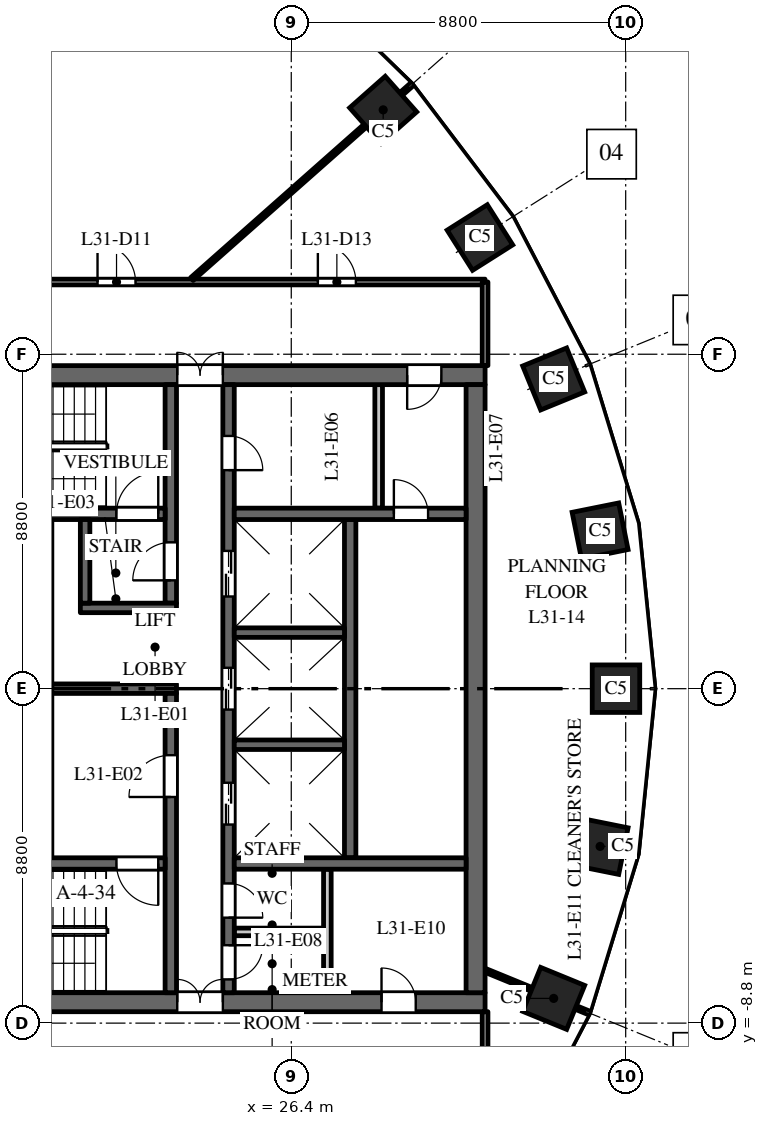
"""IFC4 building model, lengths in metres.
Left out: names, types, materials, properties, quantities, classifications, styles, units other than length and angle.
Written with IfcOpenShell. Run it as: python <this file> out.ifc"""

import sys

from ifc_helpers import new_model, si_unit, direction, frame, frame_2d, origin, origin_2d, place, context, subcontext, project, spatial, rectangle, extrude, element, fill, save


model = new_model("IFC4")
c1 = context("Model", 3, precision=1e-05, world=origin(), true_north=direction((0.0, 1.0)))
c2 = subcontext(c1, "Body", "Model", "MODEL_VIEW")
j1 = project(units=[si_unit("LENGTHUNIT", "METRE"), si_unit("PLANEANGLEUNIT", "RADIAN")], contexts=[c1])
p1 = place(None, origin())
s1 = spatial("IfcSite", under=j1, at=p1, CompositionType="ELEMENT")
p2 = place(p1, origin())
s2 = spatial("IfcBuilding", under=s1, at=p2, CompositionType="ELEMENT")
p3 = place(p2, frame((0.0, 0.0, 136.0)))
s3 = spatial("IfcBuildingStorey", under=s2, at=p3, CompositionType="ELEMENT", Elevation=136.0)
for number, where, z_axis, x_axis in (
    (1, (34.945, 0.0, 0.0), (0.0, 0.0, 1.0), (0.0, 1.0, 0.0)),
    (2, (34.527, 4.151, 0.0), (0.0, 0.0, 1.0), (-0.197, 0.98, 0.0)),
    (3, (33.305, 8.149, 0.0), (0.0, 0.0, 1.0), (-0.379, 0.925, 0.0)),
    (4, (31.365, 11.871, 0.0), (0.0, 0.0, 1.0), (-0.535, 0.845, 0.0)),
    (5, (28.819, 15.23, 0.0), (0.0, 0.0, 1.0), (-0.663, 0.749, 0.0)),
    (6, (33.305, -8.149, 0.0), (0.0, 0.0, 1.0), (0.379, 0.925, 0.0)),
    (7, (34.527, -4.151, 0.0), (0.0, 0.0, 1.0), (0.197, 0.98, 0.0)),
):
    element("IfcColumn", number, at=place(p3, frame(where, z_axis=z_axis, x_axis=x_axis)), inside=s3, PredefinedType="COLUMN", context=c2, shape_type="SweptSolid", body=[
        extrude(rectangle(XDim=1.25, YDim=1.25, at=origin_2d()), origin(), (0.0, 0.0, 1.0), 4.0),
    ])
p4 = place(p3, frame((16.5, 8.25, 0.0), z_axis=(0.0, 0.0, 1.0), x_axis=(1.0, 0.0, 0.0)))
e8 = element("IfcWall", 8, at=p4, inside=s3, PredefinedType="SHEAR", context=c2, shape_type="SweptSolid", body=[
    extrude(rectangle(XDim=15.0, YDim=0.5, at=frame_2d((7.5, 0.0))), origin(), (0.0, 0.0, 1.0), 3.7),
])
p5 = place(p4, frame((6.9, 0.0, 0.0)))
e9 = element("IfcOpeningElement", 9, at=p5, cuts=e8, PredefinedType="OPENING", context=c2, shape_type="SweptSolid", body=[
    extrude(rectangle(XDim=1.2, YDim=2.1, at=frame_2d((0.6, 1.05))), frame((0.0, 0.26, 0.0), z_axis=(0.0, -1.0, 0.0), x_axis=(1.0, 0.0, 0.0)), (0.0, 0.0, 1.0), 0.52),
])
p6 = place(p4, frame((12.95, 0.0, 0.0)))
e10 = element("IfcOpeningElement", 10, at=p6, cuts=e8, PredefinedType="OPENING", context=c2, shape_type="SweptSolid", body=[
    extrude(rectangle(XDim=0.9, YDim=2.1, at=frame_2d((0.45, 1.05))), frame((0.0, 0.26, 0.0), z_axis=(0.0, -1.0, 0.0), x_axis=(1.0, 0.0, 0.0)), (0.0, 0.0, 1.0), 0.52),
])
p7 = place(p3, frame((16.5, -8.25, 0.0), z_axis=(0.0, 0.0, 1.0), x_axis=(1.0, 0.0, 0.0)))
e11 = element("IfcWall", 11, at=p7, inside=s3, PredefinedType="SHEAR", context=c2, shape_type="SweptSolid", body=[
    extrude(rectangle(XDim=15.0, YDim=0.5, at=frame_2d((7.5, 0.0))), origin(), (0.0, 0.0, 1.0), 3.7),
])
p8 = place(p7, frame((6.9, 0.0, 0.0)))
e12 = element("IfcOpeningElement", 12, at=p8, cuts=e11, PredefinedType="OPENING", context=c2, shape_type="SweptSolid", body=[
    extrude(rectangle(XDim=1.2, YDim=2.1, at=frame_2d((0.6, 1.05))), frame((0.0, 0.26, 0.0), z_axis=(0.0, -1.0, 0.0), x_axis=(1.0, 0.0, 0.0)), (0.0, 0.0, 1.0), 0.52),
])
p9 = place(p7, frame((12.275, 0.0, 0.0)))
e13 = element("IfcOpeningElement", 13, at=p9, cuts=e11, PredefinedType="OPENING", context=c2, shape_type="SweptSolid", body=[
    extrude(rectangle(XDim=0.9, YDim=2.1, at=frame_2d((0.45, 1.05))), frame((0.0, 0.26, 0.0), z_axis=(0.0, -1.0, 0.0), x_axis=(1.0, 0.0, 0.0)), (0.0, 0.0, 1.0), 0.52),
])
p10 = place(p3, frame((27.95, -4.45, 0.0), z_axis=(0.0, 0.0, 1.0), x_axis=(0.0, 1.0, 0.0)))
e14 = element("IfcWall", 14, at=p10, inside=s3, PredefinedType="SHEAR", context=c2, shape_type="SweptSolid", body=[
    extrude(rectangle(XDim=8.9, YDim=0.3, at=frame_2d((4.45, 0.0))), origin(), (0.0, 0.0, 1.0), 3.7),
])
p11 = place(p3, frame((24.75, -8.0, 0.0), z_axis=(0.0, 0.0, 1.0), x_axis=(0.0, 1.0, 0.0)))
e15 = element("IfcWall", 15, at=p11, inside=s3, PredefinedType="SHEAR", context=c2, shape_type="SweptSolid", body=[
    extrude(rectangle(XDim=16.0, YDim=0.3, at=frame_2d((8.0, 0.0))), origin(), (0.0, 0.0, 1.0), 3.7),
])
p12 = place(p11, frame((4.425, 0.0, 0.0)))
e16 = element("IfcOpeningElement", 16, at=p12, cuts=e15, PredefinedType="OPENING", context=c2, shape_type="SweptSolid", body=[
    extrude(rectangle(XDim=1.1, YDim=2.1, at=frame_2d((0.55, 1.05))), frame((0.0, 0.16, 0.0), z_axis=(0.0, -1.0, 0.0), x_axis=(1.0, 0.0, 0.0)), (0.0, 0.0, 1.0), 0.32),
])
p13 = place(p11, frame((7.45, 0.0, 0.0)))
e17 = element("IfcOpeningElement", 17, at=p13, cuts=e15, PredefinedType="OPENING", context=c2, shape_type="SweptSolid", body=[
    extrude(rectangle(XDim=1.1, YDim=2.1, at=frame_2d((0.55, 1.05))), frame((0.0, 0.16, 0.0), z_axis=(0.0, -1.0, 0.0), x_axis=(1.0, 0.0, 0.0)), (0.0, 0.0, 1.0), 0.32),
])
p14 = place(p11, frame((10.425, 0.0, 0.0)))
e18 = element("IfcOpeningElement", 18, at=p14, cuts=e15, PredefinedType="OPENING", context=c2, shape_type="SweptSolid", body=[
    extrude(rectangle(XDim=1.2, YDim=2.1, at=frame_2d((0.6, 1.05))), frame((0.0, 0.16, 0.0), z_axis=(0.0, -1.0, 0.0), x_axis=(1.0, 0.0, 0.0)), (0.0, 0.0, 1.0), 0.32),
])
p15 = place(p11, frame((13.75, 0.0, 0.0)))
e19 = element("IfcOpeningElement", 19, at=p15, cuts=e15, PredefinedType="OPENING", context=c2, shape_type="SweptSolid", body=[
    extrude(rectangle(XDim=0.9, YDim=2.1, at=frame_2d((0.45, 1.05))), frame((0.0, 0.16, 0.0), z_axis=(0.0, -1.0, 0.0), x_axis=(1.0, 0.0, 0.0)), (0.0, 0.0, 1.0), 0.32),
])
p16 = place(p11, frame((1.975, 0.0, 0.0)))
e20 = element("IfcOpeningElement", 20, at=p16, cuts=e15, PredefinedType="OPENING", context=c2, shape_type="SweptSolid", body=[
    extrude(rectangle(XDim=0.9, YDim=2.1, at=frame_2d((0.45, 1.05))), frame((0.0, 0.16, 0.0), z_axis=(0.0, -1.0, 0.0), x_axis=(1.0, 0.0, 0.0)), (0.0, 0.0, 1.0), 0.32),
])
p17 = place(p11, frame((0.35, 0.0, 0.0)))
e21 = element("IfcOpeningElement", 21, at=p17, cuts=e15, PredefinedType="OPENING", context=c2, shape_type="SweptSolid", body=[
    extrude(rectangle(XDim=0.9, YDim=2.1, at=frame_2d((0.45, 1.05))), frame((0.0, 0.16, 0.0), z_axis=(0.0, -1.0, 0.0), x_axis=(1.0, 0.0, 0.0)), (0.0, 0.0, 1.0), 0.32),
])
p18 = place(p3, frame((20.1, 0.0, 0.0), z_axis=(0.0, 0.0, 1.0), x_axis=(1.0, 0.0, 0.0)))
e22 = element("IfcWall", 22, at=p18, inside=s3, PredefinedType="SHEAR", context=c2, shape_type="SweptSolid", body=[
    extrude(rectangle(XDim=3.28, YDim=0.25, at=frame_2d((1.64, 0.0))), origin(), (0.0, 0.0, 1.0), 3.7),
])
p19 = place(p3, frame((31.25, -8.0, 0.0), z_axis=(0.0, 0.0, 1.0), x_axis=(0.0, 1.0, 0.0)))
e23 = element("IfcWall", 23, at=p19, inside=s3, PredefinedType="SHEAR", context=c2, shape_type="SweptSolid", body=[
    extrude(rectangle(XDim=16.0, YDim=0.5, at=frame_2d((8.0, 0.0))), origin(), (0.0, 0.0, 1.0), 3.7),
])
p20 = place(p3, frame((24.9, 4.6, 0.0), z_axis=(0.0, 0.0, 1.0), x_axis=(1.0, 0.0, 0.0)))
e24 = element("IfcWall", 24, at=p20, inside=s3, PredefinedType="SHEAR", context=c2, shape_type="SweptSolid", body=[
    extrude(rectangle(XDim=6.1, YDim=0.3, at=frame_2d((3.05, 0.0))), origin(), (0.0, 0.0, 1.0), 3.7),
])
p21 = place(p20, frame((4.2, 0.0, 0.0)))
e25 = element("IfcOpeningElement", 25, at=p21, cuts=e24, PredefinedType="OPENING", context=c2, shape_type="SweptSolid", body=[
    extrude(rectangle(XDim=0.9, YDim=2.1, at=frame_2d((0.45, 1.05))), frame((0.0, 0.16, 0.0), z_axis=(0.0, -1.0, 0.0), x_axis=(1.0, 0.0, 0.0)), (0.0, 0.0, 1.0), 0.32),
])
for number, where, z_axis, x_axis in (
    (26, (28.7, 4.75, 0.0), (0.0, 0.0, 1.0), (0.0, 1.0, 0.0)),
    (27, (27.35, -8.0, 0.0), (0.0, 0.0, 1.0), (0.0, 1.0, 0.0)),
):
    element("IfcWall", number, at=place(p3, frame(where, z_axis=z_axis, x_axis=x_axis)), inside=s3, PredefinedType="PARTITIONING", context=c2, shape_type="SweptSolid", body=[
        extrude(rectangle(XDim=3.25, YDim=0.2, at=frame_2d((1.625, 0.0))), origin(), (0.0, 0.0, 1.0), 3.7),
    ])
p22 = place(p3, frame((24.9, -6.4, 0.0), z_axis=(0.0, 0.0, 1.0), x_axis=(1.0, 0.0, 0.0)))
e28 = element("IfcWall", 28, at=p22, inside=s3, PredefinedType="PARTITIONING", context=c2, shape_type="SweptSolid", body=[
    extrude(rectangle(XDim=2.35, YDim=0.2, at=frame_2d((1.175, 0.0))), origin(), (0.0, 0.0, 1.0), 3.7),
])
p23 = place(p3, frame((24.9, -4.6, 0.0), z_axis=(0.0, 0.0, 1.0), x_axis=(1.0, 0.0, 0.0)))
e29 = element("IfcWall", 29, at=p23, inside=s3, PredefinedType="SHEAR", context=c2, shape_type="SweptSolid", body=[
    extrude(rectangle(XDim=6.1, YDim=0.3, at=frame_2d((3.05, 0.0))), origin(), (0.0, 0.0, 1.0), 3.7),
])
for number, where, z_axis, x_axis in (
    (30, (24.9, -1.475, 0.0), (0.0, 0.0, 1.0), (1.0, 0.0, 0.0)),
    (31, (24.9, 1.475, 0.0), (0.0, 0.0, 1.0), (1.0, 0.0, 0.0)),
):
    element("IfcWall", number, at=place(p3, frame(where, z_axis=z_axis, x_axis=x_axis)), inside=s3, PredefinedType="SHEAR", context=c2, shape_type="SweptSolid", body=[
        extrude(rectangle(XDim=2.9, YDim=0.25, at=frame_2d((1.45, 0.0))), origin(), (0.0, 0.0, 1.0), 3.7),
    ])
p24 = place(p3, frame((23.23, 2.25, 0.0), z_axis=(0.0, 0.0, 1.0), x_axis=(0.0, 1.0, 0.0)))
e32 = element("IfcWall", 32, at=p24, inside=s3, PredefinedType="SHEAR", context=c2, shape_type="SweptSolid", body=[
    extrude(rectangle(XDim=5.75, YDim=0.3, at=frame_2d((2.875, 0.0))), origin(), (0.0, 0.0, 1.0), 3.7),
])
p25 = place(p24, frame((0.6, 0.0, 0.0)))
e33 = element("IfcOpeningElement", 33, at=p25, cuts=e32, PredefinedType="OPENING", context=c2, shape_type="SweptSolid", body=[
    extrude(rectangle(XDim=1.0, YDim=2.1, at=frame_2d((0.5, 1.05))), frame((0.0, 0.16, 0.0), z_axis=(0.0, -1.0, 0.0), x_axis=(1.0, 0.0, 0.0)), (0.0, 0.0, 1.0), 0.32),
])
p26 = place(p3, frame((23.23, -8.0, 0.0), z_axis=(0.0, 0.0, 1.0), x_axis=(0.0, 1.0, 0.0)))
e34 = element("IfcWall", 34, at=p26, inside=s3, PredefinedType="SHEAR", context=c2, shape_type="SweptSolid", body=[
    extrude(rectangle(XDim=7.875, YDim=0.3, at=frame_2d((3.938, 0.0))), origin(), (0.0, 0.0, 1.0), 3.7),
])
p27 = place(p26, frame((5.15, 0.0, 0.0)))
e35 = element("IfcOpeningElement", 35, at=p27, cuts=e34, PredefinedType="OPENING", context=c2, shape_type="SweptSolid", body=[
    extrude(rectangle(XDim=1.1, YDim=2.1, at=frame_2d((0.55, 1.05))), frame((0.0, 0.16, 0.0), z_axis=(0.0, -1.0, 0.0), x_axis=(1.0, 0.0, 0.0)), (0.0, 0.0, 1.0), 0.32),
])
p28 = place(p3, frame((16.9, 4.6, 0.0), z_axis=(0.0, 0.0, 1.0), x_axis=(1.0, 0.0, 0.0)))
e36 = element("IfcWall", 36, at=p28, inside=s3, PredefinedType="SHEAR", context=c2, shape_type="SweptSolid", body=[
    extrude(rectangle(XDim=6.18, YDim=0.3, at=frame_2d((3.09, 0.0))), origin(), (0.0, 0.0, 1.0), 3.7),
])
p29 = place(p28, frame((4.9, 0.0, 0.0)))
e37 = element("IfcOpeningElement", 37, at=p29, cuts=e36, PredefinedType="OPENING", context=c2, shape_type="SweptSolid", body=[
    extrude(rectangle(XDim=1.1, YDim=2.1, at=frame_2d((0.55, 1.05))), frame((0.0, 0.16, 0.0), z_axis=(0.0, -1.0, 0.0), x_axis=(1.0, 0.0, 0.0)), (0.0, 0.0, 1.0), 0.32),
])
p30 = place(p3, frame((16.9, -4.6, 0.0), z_axis=(0.0, 0.0, 1.0), x_axis=(1.0, 0.0, 0.0)))
e38 = element("IfcWall", 38, at=p30, inside=s3, PredefinedType="SHEAR", context=c2, shape_type="SweptSolid", body=[
    extrude(rectangle(XDim=6.18, YDim=0.3, at=frame_2d((3.09, 0.0))), origin(), (0.0, 0.0, 1.0), 3.7),
])
p31 = place(p30, frame((4.9, 0.0, 0.0)))
e39 = element("IfcOpeningElement", 39, at=p31, cuts=e38, PredefinedType="OPENING", context=c2, shape_type="SweptSolid", body=[
    extrude(rectangle(XDim=1.1, YDim=2.1, at=frame_2d((0.55, 1.05))), frame((0.0, 0.16, 0.0), z_axis=(0.0, -1.0, 0.0), x_axis=(1.0, 0.0, 0.0)), (0.0, 0.0, 1.0), 0.32),
])
p32 = place(p3, frame((20.85, 2.125, 0.0), z_axis=(0.0, 0.0, 1.0), x_axis=(1.0, 0.0, 0.0)))
e40 = element("IfcWall", 40, at=p32, inside=s3, PredefinedType="SHEAR", context=c2, shape_type="SweptSolid", body=[
    extrude(rectangle(XDim=2.53, YDim=0.25, at=frame_2d((1.265, 0.0))), origin(), (0.0, 0.0, 1.0), 3.7),
])
p33 = place(p3, frame((20.975, 2.25, 0.0), z_axis=(0.0, 0.0, 1.0), x_axis=(0.0, 1.0, 0.0)))
e41 = element("IfcWall", 41, at=p33, inside=s3, PredefinedType="SHEAR", context=c2, shape_type="SweptSolid", body=[
    extrude(rectangle(XDim=2.2, YDim=0.25, at=frame_2d((1.1, 0.0))), origin(), (0.0, 0.0, 1.0), 3.7),
])
p34 = place(p3, frame((19.777, 10.7, 0.0), z_axis=(0.0, 0.0, 1.0), x_axis=(1.0, 0.0, 0.0)))
e42 = element("IfcWall", 42, at=p34, inside=s3, PredefinedType="PARTITIONING", context=c2, shape_type="SweptSolid", body=[
    extrude(rectangle(XDim=11.723, YDim=0.15, at=frame_2d((5.861, 0.0))), origin(), (0.0, 0.0, 1.0), 2.75),
])
p35 = place(p34, frame((1.525, 0.0, 0.0)))
e43 = element("IfcOpeningElement", 43, at=p35, cuts=e42, PredefinedType="OPENING", context=c2, shape_type="SweptSolid", body=[
    extrude(rectangle(XDim=1.0, YDim=2.1, at=frame_2d((0.5, 1.05))), frame((0.0, 0.085, 0.0), z_axis=(0.0, -1.0, 0.0), x_axis=(1.0, 0.0, 0.0)), (0.0, 0.0, 1.0), 0.17),
])
p36 = place(p34, frame((7.323, 0.0, 0.0)))
e44 = element("IfcOpeningElement", 44, at=p36, cuts=e42, PredefinedType="OPENING", context=c2, shape_type="SweptSolid", body=[
    extrude(rectangle(XDim=1.0, YDim=2.1, at=frame_2d((0.5, 1.05))), frame((0.0, 0.085, 0.0), z_axis=(0.0, -1.0, 0.0), x_axis=(1.0, 0.0, 0.0)), (0.0, 0.0, 1.0), 0.17),
])
p37 = place(p3, frame((23.785, 10.778, 0.0), z_axis=(0.0, 0.0, 1.0), x_axis=(0.748985701008, 0.662586160198, 0.0)))
e45 = element("IfcWall", 45, at=p37, inside=s3, PredefinedType="PARTITIONING", context=c2, shape_type="SweptSolid", body=[
    extrude(rectangle(XDim=7.723, YDim=0.1, at=frame_2d((3.861, 0.0))), origin(), (0.0, 0.0, 1.0), 3.7),
])
p38 = place(p3, frame((31.5, -10.7, 0.0), z_axis=(0.0, 0.0, 1.0), x_axis=(0.0, 1.0, 0.0)))
e46 = element("IfcWall", 46, at=p38, inside=s3, PredefinedType="PARTITIONING", context=c2, shape_type="SweptSolid", body=[
    extrude(rectangle(XDim=2.2, YDim=0.15, at=frame_2d((1.1, 0.0))), origin(), (0.0, 0.0, 1.0), 2.9),
])
p39 = place(p3, frame((31.5, -7.41, 0.0), z_axis=(0.0, 0.0, 1.0), x_axis=(0.925344112436, -0.379128307542, 0.0)))
e47 = element("IfcWall", 47, at=p39, inside=s3, PredefinedType="PARTITIONING", context=c2, shape_type="SweptSolid", body=[
    extrude(rectangle(XDim=2.954, YDim=0.1, at=frame_2d((1.477, 0.0))), origin(), (0.0, 0.0, 1.0), 3.7),
])
p40 = place(p3, frame((31.5, 8.5, 0.0), z_axis=(0.0, 0.0, 1.0), x_axis=(0.0, 1.0, 0.0)))
e48 = element("IfcWall", 48, at=p40, inside=s3, PredefinedType="PARTITIONING", context=c2, shape_type="SweptSolid", body=[
    extrude(rectangle(XDim=2.2, YDim=0.15, at=frame_2d((1.1, 0.0))), origin(), (0.0, 0.0, 1.0), 2.9),
])
p41 = place(p12, origin())
e49 = element("IfcDoor", 49, at=p41, inside=s3, OperationType="DOUBLE_DOOR_SLIDING", PredefinedType="DOOR", context=c2, shape_type="SweptSolid", body=[
    extrude(rectangle(XDim=1.1, YDim=2.1, at=frame_2d((0.55, 1.05))), frame((0.0, 0.025, 0.0), z_axis=(0.0, -1.0, 0.0), x_axis=(1.0, 0.0, 0.0)), (0.0, 0.0, 1.0), 0.05),
])
fill(e16, e49)
p42 = place(p13, origin())
e50 = element("IfcDoor", 50, at=p42, inside=s3, OperationType="DOUBLE_DOOR_SLIDING", PredefinedType="DOOR", context=c2, shape_type="SweptSolid", body=[
    extrude(rectangle(XDim=1.1, YDim=2.1, at=frame_2d((0.55, 1.05))), frame((0.0, 0.025, 0.0), z_axis=(0.0, -1.0, 0.0), x_axis=(1.0, 0.0, 0.0)), (0.0, 0.0, 1.0), 0.05),
])
fill(e17, e50)
p43 = place(p14, origin())
e51 = element("IfcDoor", 51, at=p43, inside=s3, OperationType="DOUBLE_DOOR_SLIDING", PredefinedType="DOOR", context=c2, shape_type="SweptSolid", body=[
    extrude(rectangle(XDim=1.2, YDim=2.1, at=frame_2d((0.6, 1.05))), frame((0.0, 0.025, 0.0), z_axis=(0.0, -1.0, 0.0), x_axis=(1.0, 0.0, 0.0)), (0.0, 0.0, 1.0), 0.05),
])
fill(e18, e51)
p44 = place(p29, origin())
e52 = element("IfcDoor", 52, at=p44, inside=s3, OperationType="SINGLE_SWING_LEFT", PredefinedType="DOOR", context=c2, shape_type="SweptSolid", body=[
    extrude(rectangle(XDim=1.1, YDim=2.1, at=frame_2d((0.55, 1.05))), frame((0.0, 0.025, 0.0), z_axis=(0.0, -1.0, 0.0), x_axis=(1.0, 0.0, 0.0)), (0.0, 0.0, 1.0), 0.05),
])
fill(e37, e52)
p45 = place(p31, origin())
e53 = element("IfcDoor", 53, at=p45, inside=s3, OperationType="SINGLE_SWING_RIGHT", PredefinedType="DOOR", context=c2, shape_type="SweptSolid", body=[
    extrude(rectangle(XDim=1.1, YDim=2.1, at=frame_2d((0.55, 1.05))), frame((0.0, 0.025, 0.0), z_axis=(0.0, -1.0, 0.0), x_axis=(1.0, 0.0, 0.0)), (0.0, 0.0, 1.0), 0.05),
])
fill(e39, e53)
p46 = place(p27, origin())
e54 = element("IfcDoor", 54, at=p46, inside=s3, OperationType="SINGLE_SWING_RIGHT", PredefinedType="DOOR", context=c2, shape_type="SweptSolid", body=[
    extrude(rectangle(XDim=1.1, YDim=2.1, at=frame_2d((0.55, 1.05))), frame((0.0, 0.025, 0.0), z_axis=(0.0, -1.0, 0.0), x_axis=(1.0, 0.0, 0.0)), (0.0, 0.0, 1.0), 0.05),
])
fill(e35, e54)
p47 = place(p25, origin())
e55 = element("IfcDoor", 55, at=p47, inside=s3, OperationType="SINGLE_SWING_RIGHT", PredefinedType="DOOR", context=c2, shape_type="SweptSolid", body=[
    extrude(rectangle(XDim=1.0, YDim=2.1, at=frame_2d((0.5, 1.05))), frame((0.0, 0.025, 0.0), z_axis=(0.0, -1.0, 0.0), x_axis=(1.0, 0.0, 0.0)), (0.0, 0.0, 1.0), 0.05),
])
fill(e33, e55)
p48 = place(p5, origin())
e56 = element("IfcDoor", 56, at=p48, inside=s3, OperationType="DOUBLE_DOOR_DOUBLE_SWING", PredefinedType="DOOR", context=c2, shape_type="SweptSolid", body=[
    extrude(rectangle(XDim=1.2, YDim=2.1, at=frame_2d((0.6, 1.05))), frame((0.0, 0.025, 0.0), z_axis=(0.0, -1.0, 0.0), x_axis=(1.0, 0.0, 0.0)), (0.0, 0.0, 1.0), 0.05),
])
fill(e9, e56)
p49 = place(p8, origin())
e57 = element("IfcDoor", 57, at=p49, inside=s3, OperationType="DOUBLE_DOOR_DOUBLE_SWING", PredefinedType="DOOR", context=c2, shape_type="SweptSolid", body=[
    extrude(rectangle(XDim=1.2, YDim=2.1, at=frame_2d((0.6, 1.05))), frame((0.0, 0.025, 0.0), z_axis=(0.0, -1.0, 0.0), x_axis=(1.0, 0.0, 0.0)), (0.0, 0.0, 1.0), 0.05),
])
fill(e12, e57)
p50 = place(p15, origin())
e58 = element("IfcDoor", 58, at=p50, inside=s3, OperationType="SINGLE_SWING_LEFT", PredefinedType="DOOR", context=c2, shape_type="SweptSolid", body=[
    extrude(rectangle(XDim=0.9, YDim=2.1, at=frame_2d((0.45, 1.05))), frame((0.0, 0.025, 0.0), z_axis=(0.0, -1.0, 0.0), x_axis=(1.0, 0.0, 0.0)), (0.0, 0.0, 1.0), 0.05),
])
fill(e19, e58)
p51 = place(p6, origin())
e59 = element("IfcDoor", 59, at=p51, inside=s3, OperationType="SINGLE_SWING_LEFT", PredefinedType="DOOR", context=c2, shape_type="SweptSolid", body=[
    extrude(rectangle(XDim=0.9, YDim=2.1, at=frame_2d((0.45, 1.05))), frame((0.0, 0.025, 0.0), z_axis=(0.0, -1.0, 0.0), x_axis=(1.0, 0.0, 0.0)), (0.0, 0.0, 1.0), 0.05),
])
fill(e10, e59)
p52 = place(p16, origin())
e60 = element("IfcDoor", 60, at=p52, inside=s3, OperationType="SINGLE_SWING_LEFT", PredefinedType="DOOR", context=c2, shape_type="SweptSolid", body=[
    extrude(rectangle(XDim=0.9, YDim=2.1, at=frame_2d((0.45, 1.05))), frame((0.0, 0.025, 0.0), z_axis=(0.0, -1.0, 0.0), x_axis=(1.0, 0.0, 0.0)), (0.0, 0.0, 1.0), 0.05),
])
fill(e20, e60)
p53 = place(p17, origin())
e61 = element("IfcDoor", 61, at=p53, inside=s3, OperationType="SINGLE_SWING_RIGHT", PredefinedType="DOOR", context=c2, shape_type="SweptSolid", body=[
    extrude(rectangle(XDim=0.9, YDim=2.1, at=frame_2d((0.45, 1.05))), frame((0.0, 0.025, 0.0), z_axis=(0.0, -1.0, 0.0), x_axis=(1.0, 0.0, 0.0)), (0.0, 0.0, 1.0), 0.05),
])
fill(e21, e61)
p54 = place(p9, origin())
e62 = element("IfcDoor", 62, at=p54, inside=s3, OperationType="SINGLE_SWING_RIGHT", PredefinedType="DOOR", context=c2, shape_type="SweptSolid", body=[
    extrude(rectangle(XDim=0.9, YDim=2.1, at=frame_2d((0.45, 1.05))), frame((0.0, 0.025, 0.0), z_axis=(0.0, -1.0, 0.0), x_axis=(1.0, 0.0, 0.0)), (0.0, 0.0, 1.0), 0.05),
])
fill(e13, e62)
p55 = place(p21, origin())
e63 = element("IfcDoor", 63, at=p55, inside=s3, OperationType="SINGLE_SWING_RIGHT", PredefinedType="DOOR", context=c2, shape_type="SweptSolid", body=[
    extrude(rectangle(XDim=0.9, YDim=2.1, at=frame_2d((0.45, 1.05))), frame((0.0, 0.025, 0.0), z_axis=(0.0, -1.0, 0.0), x_axis=(1.0, 0.0, 0.0)), (0.0, 0.0, 1.0), 0.05),
])
fill(e25, e63)
p56 = place(p35, origin())
e64 = element("IfcDoor", 64, at=p56, inside=s3, OperationType="SINGLE_SWING_LEFT", PredefinedType="DOOR", context=c2, shape_type="SweptSolid", body=[
    extrude(rectangle(XDim=1.0, YDim=2.1, at=frame_2d((0.5, 1.05))), frame((0.0, 0.025, 0.0), z_axis=(0.0, -1.0, 0.0), x_axis=(1.0, 0.0, 0.0)), (0.0, 0.0, 1.0), 0.05),
])
fill(e43, e64)
p57 = place(p36, origin())
e65 = element("IfcDoor", 65, at=p57, inside=s3, OperationType="SINGLE_SWING_LEFT", PredefinedType="DOOR", context=c2, shape_type="SweptSolid", body=[
    extrude(rectangle(XDim=1.0, YDim=2.1, at=frame_2d((0.5, 1.05))), frame((0.0, 0.025, 0.0), z_axis=(0.0, -1.0, 0.0), x_axis=(1.0, 0.0, 0.0)), (0.0, 0.0, 1.0), 0.05),
])
fill(e44, e65)
save(model, sys.argv[1])
